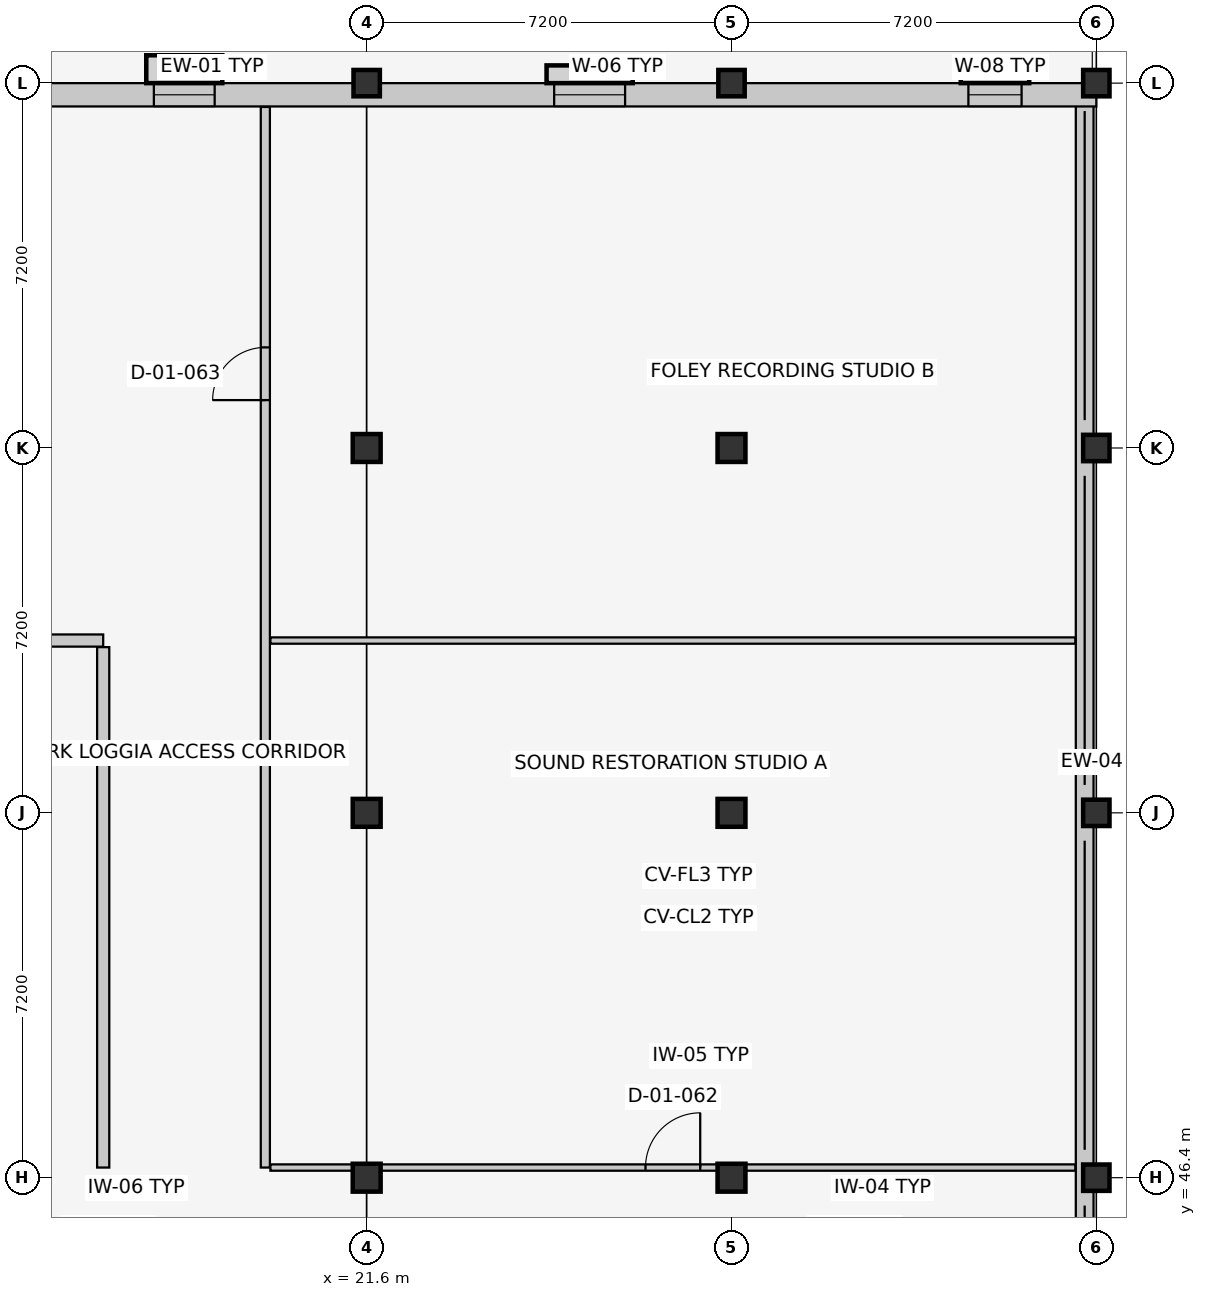
"""IFC4 building model, lengths in metres.
Left out: names, types, materials, properties, quantities, classifications, styles, units other than length and angle.
Written with IfcOpenShell. Run it as: python <this file> out.ifc"""

import sys

from ifc_helpers import new_model, si_unit, direction, frame, frame_2d, origin, origin_2d, place, context, subcontext, project, spatial, rectangle, extrude, element, fill, save


model = new_model("IFC4")
c1 = context("Model", 3, precision=1e-05, world=origin(), true_north=direction((0.0, 1.0)))
c2 = subcontext(c1, "Body", "Model", "MODEL_VIEW")
j1 = project(units=[si_unit("LENGTHUNIT", "METRE"), si_unit("PLANEANGLEUNIT", "RADIAN")], contexts=[c1])
p1 = place(None, origin())
s1 = spatial("IfcSite", under=j1, at=p1, CompositionType="ELEMENT")
p2 = place(p1, origin())
s2 = spatial("IfcBuilding", under=s1, at=p2, CompositionType="ELEMENT")
p3 = place(p2, frame((0.0, 0.0, 5.4)))
s3 = spatial("IfcBuildingStorey", under=s2, at=p3, CompositionType="ELEMENT", Elevation=5.4)
for number, where, z_axis, x_axis in (
    (1, (21.6, 46.4, 0.0), (0.0, 0.0, 1.0), (1.0, 0.0, 0.0)),
    (2, (21.6, 53.6, 0.0), (0.0, 0.0, 1.0), (1.0, 0.0, 0.0)),
    (3, (21.6, 60.8, 0.0), (0.0, 0.0, 1.0), (1.0, 0.0, 0.0)),
):
    element("IfcColumn", number, at=place(p3, frame(where, z_axis=z_axis, x_axis=x_axis)), inside=s3, PredefinedType="COLUMN", context=c2, shape_type="SweptSolid", body=[
        extrude(rectangle(XDim=0.55, YDim=0.55, at=origin_2d()), origin(), (0.0, 0.0, 1.0), 4.2),
    ])
p4 = place(p3, frame((21.6, 68.0, 0.0), z_axis=(0.0, 0.0, 1.0), x_axis=(1.0, 0.0, 0.0)))
e4 = element("IfcColumn", 4, at=p4, inside=s3, PredefinedType="COLUMN", context=c2, shape_type="SweptSolid", body=[
    extrude(rectangle(XDim=0.52, YDim=0.52, at=origin_2d()), origin(), (0.0, 0.0, 1.0), 4.2),
])
for number, where, z_axis, x_axis in (
    (5, (28.8, 46.4, 0.0), (0.0, 0.0, 1.0), (1.0, 0.0, 0.0)),
    (6, (28.8, 53.6, 0.0), (0.0, 0.0, 1.0), (1.0, 0.0, 0.0)),
    (7, (28.8, 60.8, 0.0), (0.0, 0.0, 1.0), (1.0, 0.0, 0.0)),
):
    element("IfcColumn", number, at=place(p3, frame(where, z_axis=z_axis, x_axis=x_axis)), inside=s3, PredefinedType="COLUMN", context=c2, shape_type="SweptSolid", body=[
        extrude(rectangle(XDim=0.55, YDim=0.55, at=origin_2d()), origin(), (0.0, 0.0, 1.0), 4.2),
    ])
for number, where, z_axis, x_axis in (
    (8, (28.8, 68.0, 0.0), (0.0, 0.0, 1.0), (1.0, 0.0, 0.0)),
    (9, (36.0, 46.4, 0.0), (0.0, 0.0, 1.0), (1.0, 0.0, 0.0)),
    (10, (36.0, 53.6, 0.0), (0.0, 0.0, 1.0), (1.0, 0.0, 0.0)),
    (11, (36.0, 60.8, 0.0), (0.0, 0.0, 1.0), (1.0, 0.0, 0.0)),
    (12, (36.0, 68.0, 0.0), (0.0, 0.0, 1.0), (1.0, 0.0, 0.0)),
):
    element("IfcColumn", number, at=place(p3, frame(where, z_axis=z_axis, x_axis=x_axis)), inside=s3, PredefinedType="COLUMN", context=c2, shape_type="SweptSolid", body=[
        extrude(rectangle(XDim=0.52, YDim=0.52, at=origin_2d()), origin(), (0.0, 0.0, 1.0), 4.2),
    ])
p5 = place(p3, frame((35.77, 68.0, 0.0), z_axis=(0.0, 0.0, 1.0), x_axis=(0.0, -1.0, 0.0)))
e13 = element("IfcWall", 13, at=p5, inside=s3, PredefinedType="SOLIDWALL", context=c2, shape_type="SweptSolid", body=[
    extrude(rectangle(XDim=28.8, YDim=0.35, at=frame_2d((14.4, 0.0))), origin(), (0.0, 0.0, 1.0), 0.85),
])
p6 = place(p3, frame((0.0, 67.77, 0.0), z_axis=(0.0, 0.0, 1.0), x_axis=(1.0, 0.0, 0.0)))
e14 = element("IfcWall", 14, at=p6, inside=s3, PredefinedType="SOLIDWALL", context=c2, shape_type="SweptSolid", body=[
    extrude(rectangle(XDim=36.0, YDim=0.46, at=frame_2d((18.0, 0.0))), origin(), (0.0, 0.0, 1.0), 3.235),
])
p7 = place(p6, frame((10.0, 0.0, 0.0)))
e15 = element("IfcOpeningElement", 15, at=p7, cuts=e14, PredefinedType="OPENING", context=c2, shape_type="SweptSolid", body=[
    extrude(rectangle(XDim=1.6, YDim=2.2, at=frame_2d((0.8, 1.1))), frame((0.0, 0.242, 0.0), z_axis=(0.0, -1.0, 0.0), x_axis=(1.0, 0.0, 0.0)), (0.0, 0.0, 1.0), 0.484),
])
p8 = place(p6, frame((1.25, 0.0, 0.9)))
e16 = element("IfcOpeningElement", 16, at=p8, cuts=e14, PredefinedType="OPENING", context=c2, shape_type="SweptSolid", body=[
    extrude(rectangle(XDim=1.5, YDim=1.75, at=frame_2d((0.75, 0.875))), frame((0.0, 0.242, 0.0), z_axis=(0.0, -1.0, 0.0), x_axis=(1.0, 0.0, 0.0)), (0.0, 0.0, 1.0), 0.484),
])
p9 = place(p6, frame((17.4, 0.0, 0.9)))
e17 = element("IfcOpeningElement", 17, at=p9, cuts=e14, PredefinedType="OPENING", context=c2, shape_type="SweptSolid", body=[
    extrude(rectangle(XDim=1.2, YDim=1.35, at=frame_2d((0.6, 0.675))), frame((0.0, 0.242, 0.0), z_axis=(0.0, -1.0, 0.0), x_axis=(1.0, 0.0, 0.0)), (0.0, 0.0, 1.0), 0.484),
])
p10 = place(p6, frame((25.3, 0.0, 0.9)))
e18 = element("IfcOpeningElement", 18, at=p10, cuts=e14, PredefinedType="OPENING", context=c2, shape_type="SweptSolid", body=[
    extrude(rectangle(XDim=1.4, YDim=1.35, at=frame_2d((0.7, 0.675))), frame((0.0, 0.242, 0.0), z_axis=(0.0, -1.0, 0.0), x_axis=(1.0, 0.0, 0.0)), (0.0, 0.0, 1.0), 0.484),
])
p11 = place(p6, frame((33.475, 0.0, 0.9)))
e19 = element("IfcOpeningElement", 19, at=p11, cuts=e14, PredefinedType="OPENING", context=c2, shape_type="SweptSolid", body=[
    extrude(rectangle(XDim=1.05, YDim=1.45, at=frame_2d((0.525, 0.725))), frame((0.0, 0.242, 0.0), z_axis=(0.0, -1.0, 0.0), x_axis=(1.0, 0.0, 0.0)), (0.0, 0.0, 1.0), 0.484),
])
p12 = place(p3, frame((19.6, 46.6, 0.0), z_axis=(0.0, 0.0, 1.0), x_axis=(0.0, 1.0, 0.0)))
e20 = element("IfcWall", 20, at=p12, inside=s3, PredefinedType="PARTITIONING", context=c2, shape_type="SweptSolid", body=[
    extrude(rectangle(XDim=20.93, YDim=0.18, at=frame_2d((10.465, 0.0))), origin(), (0.0, 0.0, 1.0), 3.94),
])
p13 = place(p12, frame((15.145, 0.0, 0.0)))
e21 = element("IfcOpeningElement", 21, at=p13, cuts=e20, PredefinedType="OPENING", context=c2, shape_type="SweptSolid", body=[
    extrude(rectangle(XDim=1.04, YDim=2.15, at=frame_2d((0.52, 1.075))), frame((0.0, 0.102, 0.0), z_axis=(0.0, -1.0, 0.0), x_axis=(1.0, 0.0, 0.0)), (0.0, 0.0, 1.0), 0.204),
])
p14 = place(p3, frame((0.47, 57.0, 0.0), z_axis=(0.0, 0.0, 1.0), x_axis=(1.0, 0.0, 0.0)))
e22 = element("IfcWall", 22, at=p14, inside=s3, PredefinedType="PARTITIONING", context=c2, shape_type="SweptSolid", body=[
    extrude(rectangle(XDim=15.93, YDim=0.24, at=frame_2d((7.965, 0.0))), origin(), (0.0, 0.0, 1.0), 3.94),
])
p15 = place(p14, frame((7.085, 0.0, 0.0)))
e23 = element("IfcOpeningElement", 23, at=p15, cuts=e22, PredefinedType="OPENING", context=c2, shape_type="SweptSolid", body=[
    extrude(rectangle(XDim=1.76, YDim=2.3, at=frame_2d((0.88, 1.15))), frame((0.0, 0.132, 0.0), z_axis=(0.0, -1.0, 0.0), x_axis=(1.0, 0.0, 0.0)), (0.0, 0.0, 1.0), 0.264),
])
p16 = place(p3, frame((16.4, 46.6, 0.0), z_axis=(0.0, 0.0, 1.0), x_axis=(0.0, 1.0, 0.0)))
e24 = element("IfcWall", 24, at=p16, inside=s3, PredefinedType="PARTITIONING", context=c2, shape_type="SweptSolid", body=[
    extrude(rectangle(XDim=10.27, YDim=0.24, at=frame_2d((5.135, 0.0))), origin(), (0.0, 0.0, 1.0), 3.94),
])
p17 = place(p3, frame((19.7, 46.6, 0.0), z_axis=(0.0, 0.0, 1.0), x_axis=(1.0, 0.0, 0.0)))
e25 = element("IfcWall", 25, at=p17, inside=s3, PredefinedType="PARTITIONING", context=c2, shape_type="SweptSolid", body=[
    extrude(rectangle(XDim=15.885, YDim=0.125, at=frame_2d((7.942, 0.0))), origin(), (0.0, 0.0, 1.0), 3.065),
])
p18 = place(p17, frame((7.403, 0.0, 0.0)))
e26 = element("IfcOpeningElement", 26, at=p18, cuts=e25, PredefinedType="OPENING", context=c2, shape_type="SweptSolid", body=[
    extrude(rectangle(XDim=1.08, YDim=2.15, at=frame_2d((0.54, 1.075))), frame((0.0, 0.074, 0.0), z_axis=(0.0, -1.0, 0.0), x_axis=(1.0, 0.0, 0.0)), (0.0, 0.0, 1.0), 0.149),
])
p19 = place(p3, frame((19.7, 57.0, 0.0), z_axis=(0.0, 0.0, 1.0), x_axis=(1.0, 0.0, 0.0)))
e27 = element("IfcWall", 27, at=p19, inside=s3, PredefinedType="PARTITIONING", context=c2, shape_type="SweptSolid", body=[
    extrude(rectangle(XDim=15.885, YDim=0.125, at=frame_2d((7.942, 0.0))), origin(), (0.0, 0.0, 1.0), 3.94),
])
p20 = place(p9, origin())
e28 = element("IfcWindow", 28, at=p20, inside=s3, PartitioningType="SINGLE_PANEL", PredefinedType="WINDOW", context=c2, shape_type="SweptSolid", body=[
    extrude(rectangle(XDim=1.2, YDim=1.35, at=frame_2d((0.6, 0.675))), frame((0.0, 0.03, 0.0), z_axis=(0.0, -1.0, 0.0), x_axis=(1.0, 0.0, 0.0)), (0.0, 0.0, 1.0), 0.06),
])
fill(e17, e28)
p21 = place(p10, origin())
e29 = element("IfcWindow", 29, at=p21, inside=s3, PartitioningType="SINGLE_PANEL", PredefinedType="WINDOW", context=c2, shape_type="SweptSolid", body=[
    extrude(rectangle(XDim=1.4, YDim=1.35, at=frame_2d((0.7, 0.675))), frame((0.0, 0.03, 0.0), z_axis=(0.0, -1.0, 0.0), x_axis=(1.0, 0.0, 0.0)), (0.0, 0.0, 1.0), 0.06),
])
fill(e18, e29)
p22 = place(p11, origin())
e30 = element("IfcWindow", 30, at=p22, inside=s3, PartitioningType="SINGLE_PANEL", PredefinedType="WINDOW", context=c2, shape_type="SweptSolid", body=[
    extrude(rectangle(XDim=1.05, YDim=1.45, at=frame_2d((0.525, 0.725))), frame((0.0, 0.03, 0.0), z_axis=(0.0, -1.0, 0.0), x_axis=(1.0, 0.0, 0.0)), (0.0, 0.0, 1.0), 0.06),
])
fill(e19, e30)
p23 = place(p18, origin())
e31 = element("IfcDoor", 31, at=p23, inside=s3, OperationType="SINGLE_SWING_RIGHT", PredefinedType="DOOR", context=c2, shape_type="SweptSolid", body=[
    extrude(rectangle(XDim=1.08, YDim=2.15, at=frame_2d((0.54, 1.075))), frame((0.0, 0.025, 0.0), z_axis=(0.0, -1.0, 0.0), x_axis=(1.0, 0.0, 0.0)), (0.0, 0.0, 1.0), 0.05),
])
fill(e26, e31)
p24 = place(p13, origin())
e32 = element("IfcDoor", 32, at=p24, inside=s3, OperationType="SINGLE_SWING_LEFT", PredefinedType="DOOR", context=c2, shape_type="SweptSolid", body=[
    extrude(rectangle(XDim=1.04, YDim=2.15, at=frame_2d((0.52, 1.075))), frame((0.0, 0.025, 0.0), z_axis=(0.0, -1.0, 0.0), x_axis=(1.0, 0.0, 0.0)), (0.0, 0.0, 1.0), 0.05),
])
fill(e21, e32)
save(model, sys.argv[1])
